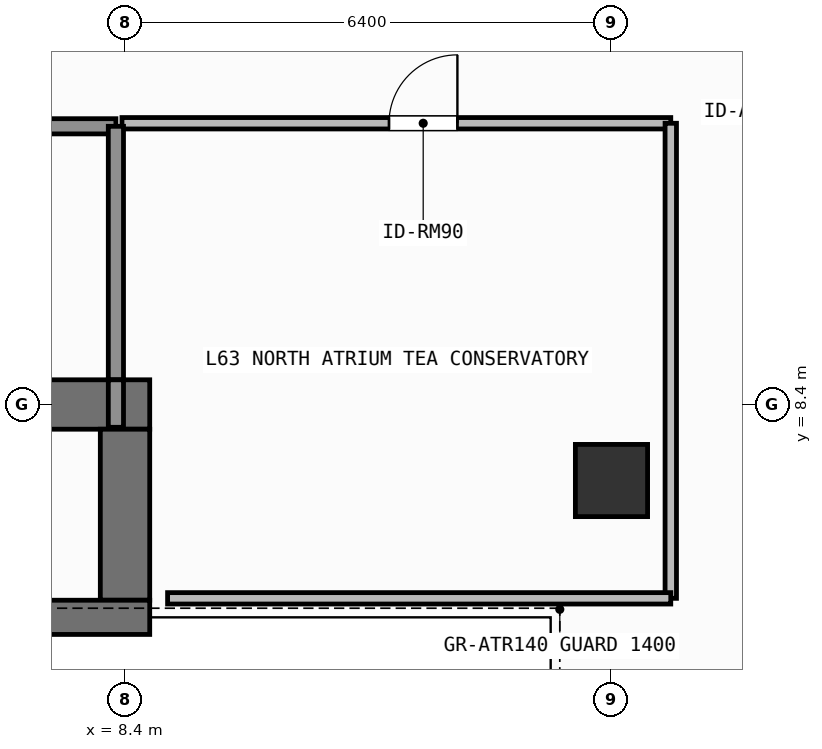
"""IFC4 building model, lengths in metres.
Left out: names, types, materials, properties, quantities, classifications, styles, units other than length and angle.
Written with IfcOpenShell. Run it as: python <this file> out.ifc"""

import sys

from ifc_helpers import new_model, si_unit, direction, frame, frame_2d, origin, origin_2d, place, context, subcontext, project, spatial, rectangle, extrude, element, fill, save


model = new_model("IFC4")
c1 = context("Model", 3, precision=1e-05, world=origin(), true_north=direction((0.0, 1.0)))
c2 = subcontext(c1, "Body", "Model", "MODEL_VIEW")
j1 = project(units=[si_unit("LENGTHUNIT", "METRE"), si_unit("PLANEANGLEUNIT", "RADIAN")], contexts=[c1])
p1 = place(None, origin())
s1 = spatial("IfcSite", under=j1, at=p1, CompositionType="ELEMENT")
p2 = place(p1, origin())
s2 = spatial("IfcBuilding", under=s1, at=p2, CompositionType="ELEMENT")
p3 = place(p2, frame((0.0, 0.0, 258.6)))
s3 = spatial("IfcBuildingStorey", under=s2, at=p3, CompositionType="ELEMENT", Elevation=258.6)
p4 = place(p3, frame((-7.55, 8.4, 0.0), z_axis=(0.0, 0.0, 1.0), x_axis=(1.0, 0.0, 0.0)))
e1 = element("IfcWall", 1, at=p4, inside=s3, PredefinedType="SHEAR", context=c2, shape_type="SweptSolid", body=[
    extrude(rectangle(XDim=16.275, YDim=0.65, at=frame_2d((8.138, 0.0))), origin(), (0.0, 0.0, 1.0), 3.9),
])
p5 = place(p3, frame((8.4, 5.825, 0.0), z_axis=(0.0, 0.0, 1.0), x_axis=(0.0, 1.0, 0.0)))
e2 = element("IfcWall", 2, at=p5, inside=s3, PredefinedType="SHEAR", context=c2, shape_type="SweptSolid", body=[
    extrude(rectangle(XDim=2.25, YDim=0.65, at=frame_2d((1.125, 0.0))), origin(), (0.0, 0.0, 1.0), 3.9),
])
p6 = place(p3, frame((3.045, 5.6, 0.0), z_axis=(0.0, 0.0, 1.0), x_axis=(1.0, 0.0, 0.0)))
e3 = element("IfcWall", 3, at=p6, inside=s3, PredefinedType="SHEAR", context=c2, shape_type="SweptSolid", body=[
    extrude(rectangle(XDim=5.68, YDim=0.45, at=frame_2d((2.84, 0.0))), origin(), (0.0, 0.0, 1.0), 3.9),
])
p7 = place(p3, frame((14.8, 7.4, 0.0), z_axis=(0.0, 0.0, 1.0), x_axis=(1.0, 0.0, 0.0)))
e4 = element("IfcColumn", 4, at=p7, inside=s3, PredefinedType="COLUMN", context=c2, shape_type="SweptSolid", body=[
    extrude(rectangle(XDim=0.95, YDim=0.95, at=origin_2d()), origin(), (0.0, 0.0, 1.0), 3.9),
])
p8 = place(p3, frame((4.58, 12.06, 0.0), z_axis=(0.0, 0.0, 1.0), x_axis=(1.0, 0.0, 0.0)))
e5 = element("IfcWall", 5, at=p8, inside=s3, PredefinedType="SOLIDWALL", context=c2, shape_type="SweptSolid", body=[
    extrude(rectangle(XDim=3.7, YDim=0.2, at=frame_2d((1.85, 0.0))), origin(), (0.0, 0.0, 1.0), 3.68),
])
p9 = place(p8, frame((1.212, 0.0, 0.0)))
e6 = element("IfcOpeningElement", 6, at=p9, cuts=e5, PredefinedType="OPENING", context=c2, shape_type="SweptSolid", body=[
    extrude(rectangle(XDim=1.1, YDim=2.15, at=frame_2d((0.55, 1.075))), frame((0.0, 0.11, 0.0), z_axis=(0.0, -1.0, 0.0), x_axis=(1.0, 0.0, 0.0)), (0.0, 0.0, 1.0), 0.22),
])
p10 = place(p3, frame((8.36, 12.1, 0.0), z_axis=(0.0, 0.0, 1.0), x_axis=(1.0, 0.0, 0.0)))
e7 = element("IfcWall", 7, at=p10, inside=s3, PredefinedType="PARTITIONING", context=c2, shape_type="SweptSolid", body=[
    extrude(rectangle(XDim=7.22, YDim=0.15, at=frame_2d((3.61, 0.0))), origin(), (0.0, 0.0, 1.0), 3.68),
])
p11 = place(p10, frame((3.513, 0.0, 0.0)))
e8 = element("IfcOpeningElement", 8, at=p11, cuts=e7, PredefinedType="OPENING", context=c2, shape_type="SweptSolid", body=[
    extrude(rectangle(XDim=0.9, YDim=2.1, at=frame_2d((0.45, 1.05))), frame((0.0, 0.085, 0.0), z_axis=(0.0, -1.0, 0.0), x_axis=(1.0, 0.0, 0.0)), (0.0, 0.0, 1.0), 0.17),
])
p12 = place(p3, frame((8.28, 8.725, 0.0), z_axis=(0.0, 0.0, 1.0), x_axis=(0.0, 1.0, 0.0)))
e9 = element("IfcWall", 9, at=p12, inside=s3, PredefinedType="SOLIDWALL", context=c2, shape_type="SweptSolid", body=[
    extrude(rectangle(XDim=3.335, YDim=0.2, at=frame_2d((1.667, 0.0))), origin(), (0.0, 0.0, 1.0), 3.68),
])
p13 = place(p3, frame((8.28, 8.1, 0.0), z_axis=(0.0, 0.0, 1.0), x_axis=(0.0, 1.0, 0.0)))
e10 = element("IfcWall", 10, at=p13, inside=s3, PredefinedType="SOLIDWALL", context=c2, shape_type="SweptSolid", body=[
    extrude(rectangle(XDim=0.625, YDim=0.2, at=frame_2d((0.312, 0.0))), origin(), (0.0, 0.0, 1.0), 3.68),
])
p14 = place(p3, frame((15.58, 5.85, 0.0), z_axis=(0.0, 0.0, 1.0), x_axis=(0.0, 1.0, 0.0)))
e11 = element("IfcWall", 11, at=p14, inside=s3, PredefinedType="PARTITIONING", context=c2, shape_type="SweptSolid", body=[
    extrude(rectangle(XDim=6.25, YDim=0.15, at=frame_2d((3.125, 0.0))), origin(), (0.0, 0.0, 1.0), 3.68),
])
p15 = place(p3, frame((8.96, 5.85, 0.0), z_axis=(0.0, 0.0, 1.0), x_axis=(1.0, 0.0, 0.0)))
e12 = element("IfcWall", 12, at=p15, inside=s3, PredefinedType="PARTITIONING", context=c2, shape_type="SweptSolid", body=[
    extrude(rectangle(XDim=6.62, YDim=0.15, at=frame_2d((3.31, 0.0))), origin(), (0.0, 0.0, 1.0), 3.68),
])
p16 = place(p11, origin())
e13 = element("IfcDoor", 13, at=p16, inside=s3, OperationType="SINGLE_SWING_RIGHT", PredefinedType="DOOR", context=c2, shape_type="SweptSolid", body=[
    extrude(rectangle(XDim=0.9, YDim=2.1, at=frame_2d((0.45, 1.05))), frame((0.0, 0.025, 0.0), z_axis=(0.0, -1.0, 0.0), x_axis=(1.0, 0.0, 0.0)), (0.0, 0.0, 1.0), 0.05),
])
fill(e8, e13)
save(model, sys.argv[1])
